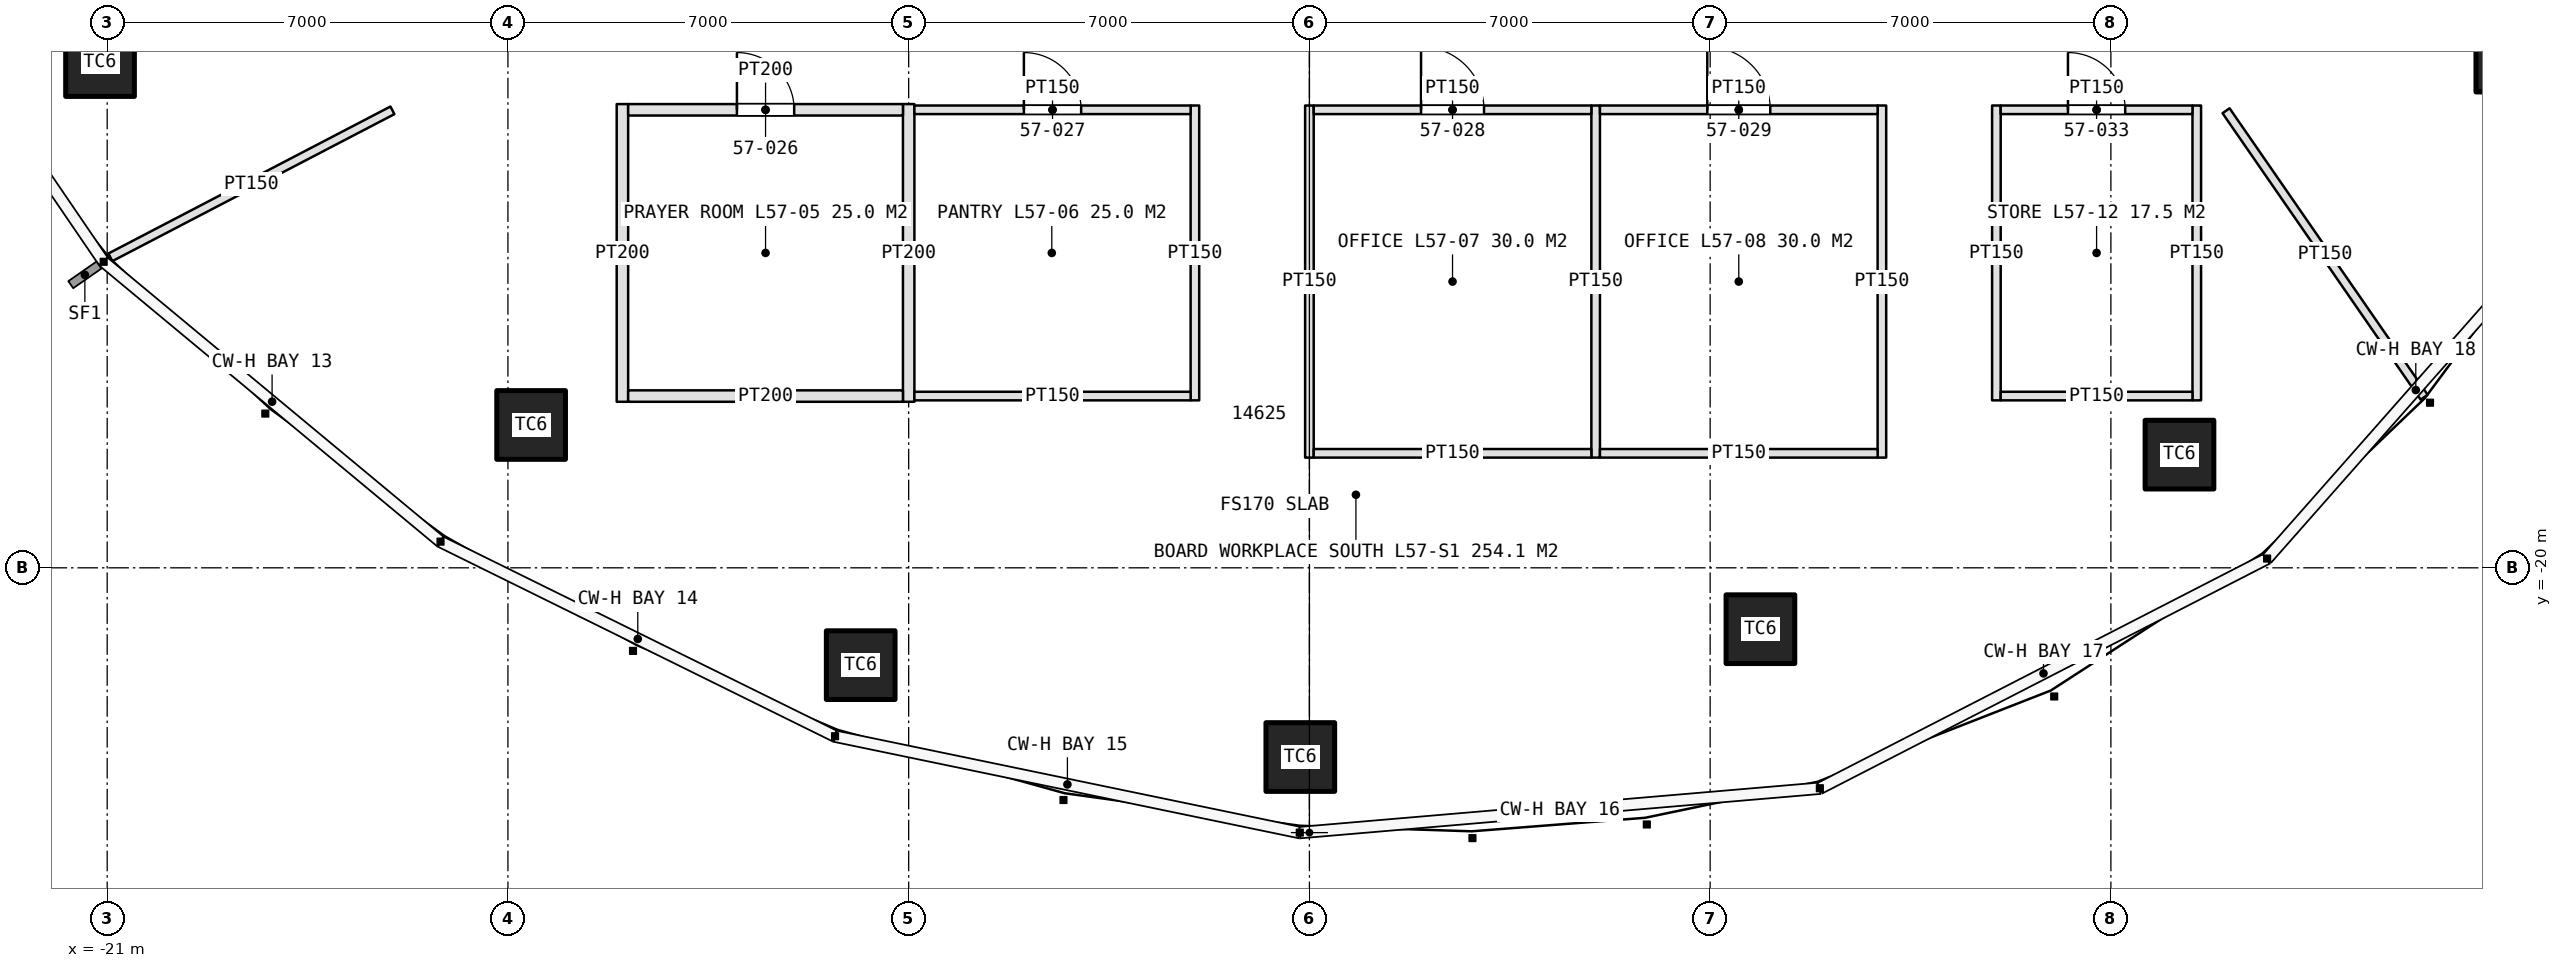
"""IFC4 building model, lengths in metres.
Left out: names, types, materials, properties, quantities, classifications, styles, units other than length and angle.
Written with IfcOpenShell. Run it as: python <this file> out.ifc"""

import sys

from ifc_helpers import new_model, si_unit, direction, frame, frame_2d, origin, origin_2d, place, context, subcontext, project, spatial, rectangle, extrude, element, fill, save


model = new_model("IFC4")
c1 = context("Model", 3, precision=1e-05, world=origin(), true_north=direction((0.0, 1.0)))
c2 = subcontext(c1, "Body", "Model", "MODEL_VIEW")
j1 = project(units=[si_unit("LENGTHUNIT", "METRE"), si_unit("PLANEANGLEUNIT", "RADIAN")], contexts=[c1])
p1 = place(None, origin())
s1 = spatial("IfcSite", under=j1, at=p1, CompositionType="ELEMENT")
p2 = place(p1, origin())
s2 = spatial("IfcBuilding", under=s1, at=p2, CompositionType="ELEMENT")
p3 = place(p2, frame((0.0, 0.0, 257.8)))
s3 = spatial("IfcBuildingStorey", under=s2, at=p3, CompositionType="ELEMENT", Elevation=257.8)
for number, where, z_axis, x_axis in (
    (1, (-21.125, -11.166, 0.0), (0.0, 0.0, 1.0), (1.0, 0.0, 0.0)),
    (2, (-13.595, -17.505, 0.0), (0.0, 0.0, 1.0), (1.0, 0.0, 0.0)),
    (3, (-7.838, -21.7, 0.0), (0.0, 0.0, 1.0), (1.0, 0.0, 0.0)),
    (4, (-0.159, -23.305, 0.0), (0.0, 0.0, 1.0), (1.0, 0.0, 0.0)),
    (5, (7.878, -21.072, 0.0), (0.0, 0.0, 1.0), (1.0, 0.0, 0.0)),
    (6, (15.198, -18.023, 0.0), (0.0, 0.0, 1.0), (1.0, 0.0, 0.0)),
    (7, (20.977, -11.088, 0.0), (0.0, 0.0, 1.0), (1.0, 0.0, 0.0)),
):
    element("IfcColumn", number, at=place(p3, frame(where, z_axis=z_axis, x_axis=x_axis)), inside=s3, PredefinedType="COLUMN", context=c2, shape_type="SweptSolid", body=[
        extrude(rectangle(XDim=1.2, YDim=1.2, at=origin_2d()), origin(), (0.0, 0.0, 1.0), 4.2),
    ])
for number, where, z_axis, x_axis in (
    (8, (-12.0, -11.9, 0.0), (0.0, 0.0, 1.0), (0.0, -1.0, 0.0)),
    (9, (-7.0, -11.9, 0.0), (0.0, 0.0, 1.0), (0.0, -1.0, 0.0)),
):
    element("IfcWall", number, at=place(p3, frame(where, z_axis=z_axis, x_axis=x_axis)), inside=s3, PredefinedType="PARTITIONING", context=c2, shape_type="SweptSolid", body=[
        extrude(rectangle(XDim=5.2, YDim=0.2, at=frame_2d((2.6, 0.0))), origin(), (0.0, 0.0, 1.0), 3.0),
    ])
p4 = place(p3, frame((-2.0, -11.925, 0.0), z_axis=(0.0, 0.0, 1.0), x_axis=(0.0, -1.0, 0.0)))
e10 = element("IfcWall", 10, at=p4, inside=s3, PredefinedType="PARTITIONING", context=c2, shape_type="SweptSolid", body=[
    extrude(rectangle(XDim=5.15, YDim=0.15, at=frame_2d((2.575, 0.0))), origin(), (0.0, 0.0, 1.0), 3.0),
])
p5 = place(p3, frame((-11.9, -12.0, 0.0), z_axis=(0.0, 0.0, 1.0), x_axis=(1.0, 0.0, 0.0)))
e11 = element("IfcWall", 11, at=p5, inside=s3, PredefinedType="PARTITIONING", context=c2, shape_type="SweptSolid", body=[
    extrude(rectangle(XDim=4.8, YDim=0.2, at=frame_2d((2.4, 0.0))), origin(), (0.0, 0.0, 1.0), 3.0),
])
p6 = place(p5, frame((1.9, 0.0, 0.0)))
e12 = element("IfcOpeningElement", 12, at=p6, cuts=e11, PredefinedType="OPENING", context=c2, shape_type="SweptSolid", body=[
    extrude(rectangle(XDim=1.0, YDim=2.2, at=frame_2d((0.5, 1.1))), frame((0.0, 0.11, 0.0), z_axis=(0.0, -1.0, 0.0), x_axis=(1.0, 0.0, 0.0)), (0.0, 0.0, 1.0), 0.22),
])
p7 = place(p3, frame((-11.9, -17.0, 0.0), z_axis=(0.0, 0.0, 1.0), x_axis=(1.0, 0.0, 0.0)))
e13 = element("IfcWall", 13, at=p7, inside=s3, PredefinedType="PARTITIONING", context=c2, shape_type="SweptSolid", body=[
    extrude(rectangle(XDim=4.8, YDim=0.2, at=frame_2d((2.4, 0.0))), origin(), (0.0, 0.0, 1.0), 3.0),
])
p8 = place(p3, frame((-6.9, -12.0, 0.0), z_axis=(0.0, 0.0, 1.0), x_axis=(1.0, 0.0, 0.0)))
e14 = element("IfcWall", 14, at=p8, inside=s3, PredefinedType="PARTITIONING", context=c2, shape_type="SweptSolid", body=[
    extrude(rectangle(XDim=4.825, YDim=0.15, at=frame_2d((2.413, 0.0))), origin(), (0.0, 0.0, 1.0), 3.0),
])
p9 = place(p8, frame((1.913, 0.0, 0.0)))
e15 = element("IfcOpeningElement", 15, at=p9, cuts=e14, PredefinedType="OPENING", context=c2, shape_type="SweptSolid", body=[
    extrude(rectangle(XDim=1.0, YDim=2.2, at=frame_2d((0.5, 1.1))), frame((0.0, 0.085, 0.0), z_axis=(0.0, -1.0, 0.0), x_axis=(1.0, 0.0, 0.0)), (0.0, 0.0, 1.0), 0.17),
])
p10 = place(p3, frame((-6.9, -17.0, 0.0), z_axis=(0.0, 0.0, 1.0), x_axis=(1.0, 0.0, 0.0)))
e16 = element("IfcWall", 16, at=p10, inside=s3, PredefinedType="PARTITIONING", context=c2, shape_type="SweptSolid", body=[
    extrude(rectangle(XDim=4.825, YDim=0.15, at=frame_2d((2.413, 0.0))), origin(), (0.0, 0.0, 1.0), 3.0),
])
for number, where, z_axis, x_axis in (
    (17, (0.0, -11.925, 0.0), (0.0, 0.0, 1.0), (0.0, -1.0, 0.0)),
    (18, (5.0, -11.925, 0.0), (0.0, 0.0, 1.0), (0.0, -1.0, 0.0)),
    (19, (10.0, -11.925, 0.0), (0.0, 0.0, 1.0), (0.0, -1.0, 0.0)),
):
    element("IfcWall", number, at=place(p3, frame(where, z_axis=z_axis, x_axis=x_axis)), inside=s3, PredefinedType="PARTITIONING", context=c2, shape_type="SweptSolid", body=[
        extrude(rectangle(XDim=6.15, YDim=0.15, at=frame_2d((3.075, 0.0))), origin(), (0.0, 0.0, 1.0), 3.0),
    ])
p11 = place(p3, frame((0.075, -12.0, 0.0), z_axis=(0.0, 0.0, 1.0), x_axis=(1.0, 0.0, 0.0)))
e20 = element("IfcWall", 20, at=p11, inside=s3, PredefinedType="PARTITIONING", context=c2, shape_type="SweptSolid", body=[
    extrude(rectangle(XDim=4.85, YDim=0.15, at=frame_2d((2.425, 0.0))), origin(), (0.0, 0.0, 1.0), 3.0),
])
p12 = place(p11, frame((1.875, 0.0, 0.0)))
e21 = element("IfcOpeningElement", 21, at=p12, cuts=e20, PredefinedType="OPENING", context=c2, shape_type="SweptSolid", body=[
    extrude(rectangle(XDim=1.1, YDim=2.3, at=frame_2d((0.55, 1.15))), frame((0.0, 0.085, 0.0), z_axis=(0.0, -1.0, 0.0), x_axis=(1.0, 0.0, 0.0)), (0.0, 0.0, 1.0), 0.17),
])
p13 = place(p3, frame((0.075, -18.0, 0.0), z_axis=(0.0, 0.0, 1.0), x_axis=(1.0, 0.0, 0.0)))
e22 = element("IfcWall", 22, at=p13, inside=s3, PredefinedType="PARTITIONING", context=c2, shape_type="SweptSolid", body=[
    extrude(rectangle(XDim=4.85, YDim=0.15, at=frame_2d((2.425, 0.0))), origin(), (0.0, 0.0, 1.0), 3.0),
])
p14 = place(p3, frame((5.075, -12.0, 0.0), z_axis=(0.0, 0.0, 1.0), x_axis=(1.0, 0.0, 0.0)))
e23 = element("IfcWall", 23, at=p14, inside=s3, PredefinedType="PARTITIONING", context=c2, shape_type="SweptSolid", body=[
    extrude(rectangle(XDim=4.85, YDim=0.15, at=frame_2d((2.425, 0.0))), origin(), (0.0, 0.0, 1.0), 3.0),
])
p15 = place(p14, frame((1.875, 0.0, 0.0)))
e24 = element("IfcOpeningElement", 24, at=p15, cuts=e23, PredefinedType="OPENING", context=c2, shape_type="SweptSolid", body=[
    extrude(rectangle(XDim=1.1, YDim=2.3, at=frame_2d((0.55, 1.15))), frame((0.0, 0.085, 0.0), z_axis=(0.0, -1.0, 0.0), x_axis=(1.0, 0.0, 0.0)), (0.0, 0.0, 1.0), 0.17),
])
p16 = place(p3, frame((5.075, -18.0, 0.0), z_axis=(0.0, 0.0, 1.0), x_axis=(1.0, 0.0, 0.0)))
e25 = element("IfcWall", 25, at=p16, inside=s3, PredefinedType="PARTITIONING", context=c2, shape_type="SweptSolid", body=[
    extrude(rectangle(XDim=4.85, YDim=0.15, at=frame_2d((2.425, 0.0))), origin(), (0.0, 0.0, 1.0), 3.0),
])
for number, where, z_axis, x_axis in (
    (26, (12.0, -11.925, 0.0), (0.0, 0.0, 1.0), (0.0, -1.0, 0.0)),
    (27, (15.5, -11.925, 0.0), (0.0, 0.0, 1.0), (0.0, -1.0, 0.0)),
):
    element("IfcWall", number, at=place(p3, frame(where, z_axis=z_axis, x_axis=x_axis)), inside=s3, PredefinedType="PARTITIONING", context=c2, shape_type="SweptSolid", body=[
        extrude(rectangle(XDim=5.15, YDim=0.15, at=frame_2d((2.575, 0.0))), origin(), (0.0, 0.0, 1.0), 3.0),
    ])
p17 = place(p3, frame((12.075, -12.0, 0.0), z_axis=(0.0, 0.0, 1.0), x_axis=(1.0, 0.0, 0.0)))
e28 = element("IfcWall", 28, at=p17, inside=s3, PredefinedType="PARTITIONING", context=c2, shape_type="SweptSolid", body=[
    extrude(rectangle(XDim=3.35, YDim=0.15, at=frame_2d((1.675, 0.0))), origin(), (0.0, 0.0, 1.0), 3.0),
])
p18 = place(p17, frame((1.175, 0.0, 0.0)))
e29 = element("IfcOpeningElement", 29, at=p18, cuts=e28, PredefinedType="OPENING", context=c2, shape_type="SweptSolid", body=[
    extrude(rectangle(XDim=1.0, YDim=2.2, at=frame_2d((0.5, 1.1))), frame((0.0, 0.085, 0.0), z_axis=(0.0, -1.0, 0.0), x_axis=(1.0, 0.0, 0.0)), (0.0, 0.0, 1.0), 0.17),
])
p19 = place(p3, frame((12.075, -17.0, 0.0), z_axis=(0.0, 0.0, 1.0), x_axis=(1.0, 0.0, 0.0)))
e30 = element("IfcWall", 30, at=p19, inside=s3, PredefinedType="PARTITIONING", context=c2, shape_type="SweptSolid", body=[
    extrude(rectangle(XDim=3.35, YDim=0.15, at=frame_2d((1.675, 0.0))), origin(), (0.0, 0.0, 1.0), 3.0),
])
p20 = place(p3, frame((-16.018, -12.009, 0.0), z_axis=(0.0, 0.0, 1.0), x_axis=(-0.886831549241, -0.462092851351, 0.0)))
e31 = element("IfcWall", 31, at=p20, inside=s3, PredefinedType="PARTITIONING", context=c2, shape_type="SweptSolid", body=[
    extrude(rectangle(XDim=5.555, YDim=0.15, at=frame_2d((2.778, 0.0))), origin(), (0.0, 0.0, 1.0), 3.0),
])
p21 = place(p3, frame((16.011, -12.016, 0.0), z_axis=(0.0, 0.0, 1.0), x_axis=(0.568863489071, -0.822431961199, 0.0)))
e32 = element("IfcWall", 32, at=p21, inside=s3, PredefinedType="PARTITIONING", context=c2, shape_type="SweptSolid", body=[
    extrude(rectangle(XDim=6.083, YDim=0.15, at=frame_2d((3.042, 0.0))), origin(), (0.0, 0.0, 1.0), 3.0),
])
p22 = place(p6, origin())
e33 = element("IfcDoor", 33, at=p22, inside=s3, OperationType="SINGLE_SWING_LEFT", PredefinedType="DOOR", context=c2, shape_type="SweptSolid", body=[
    extrude(rectangle(XDim=1.0, YDim=2.2, at=frame_2d((0.5, 1.1))), frame((0.0, 0.025, 0.0), z_axis=(0.0, -1.0, 0.0), x_axis=(1.0, 0.0, 0.0)), (0.0, 0.0, 1.0), 0.05),
])
fill(e12, e33)
p23 = place(p9, origin())
e34 = element("IfcDoor", 34, at=p23, inside=s3, OperationType="SINGLE_SWING_LEFT", PredefinedType="DOOR", context=c2, shape_type="SweptSolid", body=[
    extrude(rectangle(XDim=1.0, YDim=2.2, at=frame_2d((0.5, 1.1))), frame((0.0, 0.025, 0.0), z_axis=(0.0, -1.0, 0.0), x_axis=(1.0, 0.0, 0.0)), (0.0, 0.0, 1.0), 0.05),
])
fill(e15, e34)
p24 = place(p12, origin())
e35 = element("IfcDoor", 35, at=p24, inside=s3, OperationType="SINGLE_SWING_LEFT", PredefinedType="DOOR", context=c2, shape_type="SweptSolid", body=[
    extrude(rectangle(XDim=1.1, YDim=2.3, at=frame_2d((0.55, 1.15))), frame((0.0, 0.025, 0.0), z_axis=(0.0, -1.0, 0.0), x_axis=(1.0, 0.0, 0.0)), (0.0, 0.0, 1.0), 0.05),
])
fill(e21, e35)
p25 = place(p15, origin())
e36 = element("IfcDoor", 36, at=p25, inside=s3, OperationType="SINGLE_SWING_LEFT", PredefinedType="DOOR", context=c2, shape_type="SweptSolid", body=[
    extrude(rectangle(XDim=1.1, YDim=2.3, at=frame_2d((0.55, 1.15))), frame((0.0, 0.025, 0.0), z_axis=(0.0, -1.0, 0.0), x_axis=(1.0, 0.0, 0.0)), (0.0, 0.0, 1.0), 0.05),
])
fill(e24, e36)
p26 = place(p18, origin())
e37 = element("IfcDoor", 37, at=p26, inside=s3, OperationType="SINGLE_SWING_LEFT", PredefinedType="DOOR", context=c2, shape_type="SweptSolid", body=[
    extrude(rectangle(XDim=1.0, YDim=2.2, at=frame_2d((0.5, 1.1))), frame((0.0, 0.025, 0.0), z_axis=(0.0, -1.0, 0.0), x_axis=(1.0, 0.0, 0.0)), (0.0, 0.0, 1.0), 0.05),
])
fill(e29, e37)
save(model, sys.argv[1])
